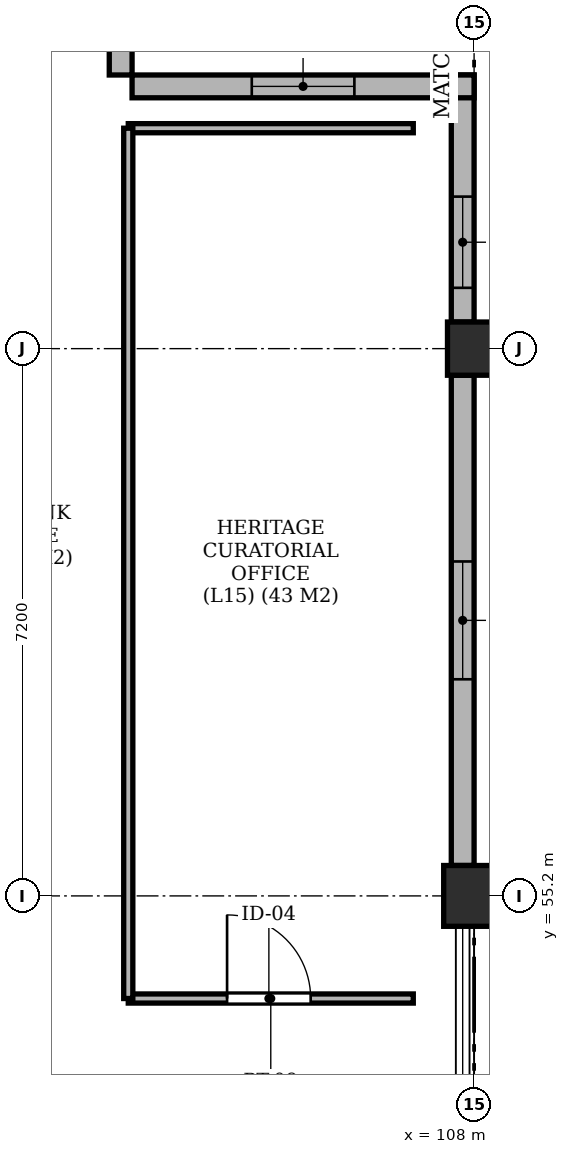
"""IFC4 building model, lengths in metres.
Left out: names, types, materials, properties, quantities, classifications, styles, units other than length and angle.
Written with IfcOpenShell. Run it as: python <this file> out.ifc"""

import sys

from ifc_helpers import new_model, si_unit, direction, frame, frame_2d, origin, origin_2d, place, context, subcontext, project, spatial, rectangle, extrude, element, fill, save


model = new_model("IFC4")
c1 = context("Model", 3, precision=1e-05, world=origin(), true_north=direction((0.0, 1.0)))
c2 = subcontext(c1, "Body", "Model", "MODEL_VIEW")
j1 = project(units=[si_unit("LENGTHUNIT", "METRE"), si_unit("PLANEANGLEUNIT", "RADIAN")], contexts=[c1])
p1 = place(None, origin())
s1 = spatial("IfcSite", under=j1, at=p1, CompositionType="ELEMENT")
p2 = place(p1, origin())
s2 = spatial("IfcBuilding", under=s1, at=p2, CompositionType="ELEMENT")
p3 = place(p2, frame((0.0, 0.0, 60.05)))
s3 = spatial("IfcBuildingStorey", under=s2, at=p3, CompositionType="ELEMENT", Elevation=60.05)
p4 = place(p3, frame((108.0, 55.2, -0.21), z_axis=(0.0, 0.0, 1.0), x_axis=(1.0, 0.0, 0.0)))
e1 = element("IfcColumn", 1, at=p4, inside=s3, PredefinedType="COLUMN", context=c2, shape_type="SweptSolid", body=[
    extrude(rectangle(XDim=0.8, YDim=0.8, at=origin_2d()), origin(), (0.0, 0.0, 1.0), 3.25),
])
p5 = place(p3, frame((108.0, 62.4, -0.21), z_axis=(0.0, 0.0, 1.0), x_axis=(1.0, 0.0, 0.0)))
e2 = element("IfcColumn", 2, at=p5, inside=s3, PredefinedType="COLUMN", context=c2, shape_type="SweptSolid", body=[
    extrude(rectangle(XDim=0.7, YDim=0.7, at=origin_2d()), origin(), (0.0, 0.0, 1.0), 3.25),
])
p6 = place(p3, frame((107.85, 55.6, 0.0), z_axis=(0.0, 0.0, 1.0), x_axis=(0.0, 1.0, 0.0)))
e3 = element("IfcWall", 3, at=p6, inside=s3, PredefinedType="SOLIDWALL", context=c2, shape_type="SweptSolid", body=[
    extrude(rectangle(XDim=6.45, YDim=0.3, at=frame_2d((3.225, 0.0))), origin(), (0.0, 0.0, 1.0), 2.53),
])
p7 = place(p6, frame((2.45, 0.0, 0.62)))
e4 = element("IfcOpeningElement", 4, at=p7, cuts=e3, PredefinedType="OPENING", context=c2, shape_type="SweptSolid", body=[
    extrude(rectangle(XDim=1.55, YDim=1.81, at=frame_2d((0.775, 0.905))), frame((0.0, 0.162, 0.0), z_axis=(0.0, -1.0, 0.0), x_axis=(1.0, 0.0, 0.0)), (0.0, 0.0, 1.0), 0.324),
])
p8 = place(p3, frame((107.85, 62.75, 0.0), z_axis=(0.0, 0.0, 1.0), x_axis=(0.0, 1.0, 0.0)))
e5 = element("IfcWall", 5, at=p8, inside=s3, PredefinedType="SOLIDWALL", context=c2, shape_type="SweptSolid", body=[
    extrude(rectangle(XDim=3.25, YDim=0.3, at=frame_2d((1.625, 0.0))), origin(), (0.0, 0.0, 1.0), 2.53),
])
p9 = place(p8, frame((0.45, 0.0, 0.62)))
e6 = element("IfcOpeningElement", 6, at=p9, cuts=e5, PredefinedType="OPENING", context=c2, shape_type="SweptSolid", body=[
    extrude(rectangle(XDim=1.2, YDim=1.65, at=frame_2d((0.6, 0.825))), frame((0.0, 0.162, 0.0), z_axis=(0.0, -1.0, 0.0), x_axis=(1.0, 0.0, 0.0)), (0.0, 0.0, 1.0), 0.324),
])
p10 = place(p3, frame((108.0, 65.85, 0.0), z_axis=(0.0, 0.0, 1.0), x_axis=(-1.0, 0.0, 0.0)))
e7 = element("IfcWall", 7, at=p10, inside=s3, PredefinedType="SOLIDWALL", context=c2, shape_type="SweptSolid", body=[
    extrude(rectangle(XDim=4.5, YDim=0.3, at=frame_2d((2.25, 0.0))), origin(), (0.0, 0.0, 1.0), 2.53),
])
p11 = place(p10, frame((1.575, 0.0, 0.62)))
e8 = element("IfcOpeningElement", 8, at=p11, cuts=e7, PredefinedType="OPENING", context=c2, shape_type="SweptSolid", body=[
    extrude(rectangle(XDim=1.35, YDim=1.8, at=frame_2d((0.675, 0.9))), frame((0.0, 0.162, 0.0), z_axis=(0.0, -1.0, 0.0), x_axis=(1.0, 0.0, 0.0)), (0.0, 0.0, 1.0), 0.324),
])
p12 = place(p3, frame((103.35, 66.0, 0.0), z_axis=(0.0, 0.0, 1.0), x_axis=(0.0, 1.0, 0.0)))
e9 = element("IfcWall", 9, at=p12, inside=s3, PredefinedType="SOLIDWALL", context=c2, shape_type="SweptSolid", body=[
    extrude(rectangle(XDim=3.6, YDim=0.3, at=frame_2d((1.8, 0.0))), origin(), (0.0, 0.0, 1.0), 2.53),
])
p13 = place(p12, frame((1.175, 0.0, 0.62)))
e10 = element("IfcOpeningElement", 10, at=p13, cuts=e9, PredefinedType="OPENING", context=c2, shape_type="SweptSolid", body=[
    extrude(rectangle(XDim=1.25, YDim=1.75, at=frame_2d((0.625, 0.875))), frame((0.0, 0.162, 0.0), z_axis=(0.0, -1.0, 0.0), x_axis=(1.0, 0.0, 0.0)), (0.0, 0.0, 1.0), 0.324),
])
p14 = place(p3, frame((103.45, 53.85, 0.0), z_axis=(0.0, 0.0, 1.0), x_axis=(1.0, 0.0, 0.0)))
e11 = element("IfcWall", 11, at=p14, inside=s3, PredefinedType="PARTITIONING", context=c2, shape_type="SweptSolid", body=[
    extrude(rectangle(XDim=3.75, YDim=0.12, at=frame_2d((1.875, 0.0))), origin(), (0.0, 0.0, 1.0), 2.53),
])
p15 = place(p14, frame((1.3, 0.0, 0.0)))
e12 = element("IfcOpeningElement", 12, at=p15, cuts=e11, PredefinedType="OPENING", context=c2, shape_type="SweptSolid", body=[
    extrude(rectangle(XDim=1.1, YDim=2.15, at=frame_2d((0.55, 1.075))), frame((0.0, 0.072, 0.0), z_axis=(0.0, -1.0, 0.0), x_axis=(1.0, 0.0, 0.0)), (0.0, 0.0, 1.0), 0.144),
])
p16 = place(p3, frame((103.45, 65.3, 0.0), z_axis=(0.0, 0.0, 1.0), x_axis=(1.0, 0.0, 0.0)))
e13 = element("IfcWall", 13, at=p16, inside=s3, PredefinedType="PARTITIONING", context=c2, shape_type="SweptSolid", body=[
    extrude(rectangle(XDim=3.75, YDim=0.12, at=frame_2d((1.875, 0.0))), origin(), (0.0, 0.0, 1.0), 2.53),
])
p17 = place(p3, frame((103.45, 53.85, 0.0), z_axis=(0.0, 0.0, 1.0), x_axis=(0.0, 1.0, 0.0)))
e14 = element("IfcWall", 14, at=p17, inside=s3, PredefinedType="PARTITIONING", context=c2, shape_type="SweptSolid", body=[
    extrude(rectangle(XDim=11.45, YDim=0.12, at=frame_2d((5.725, 0.0))), origin(), (0.0, 0.0, 1.0), 2.53),
])
p18 = place(p7, origin())
e15 = element("IfcWindow", 15, at=p18, inside=s3, PartitioningType="SINGLE_PANEL", PredefinedType="WINDOW", context=c2, shape_type="SweptSolid", body=[
    extrude(rectangle(XDim=1.55, YDim=1.81, at=frame_2d((0.775, 0.905))), frame((0.0, 0.03, 0.0), z_axis=(0.0, -1.0, 0.0), x_axis=(1.0, 0.0, 0.0)), (0.0, 0.0, 1.0), 0.06),
])
fill(e4, e15)
p19 = place(p9, origin())
e16 = element("IfcWindow", 16, at=p19, inside=s3, PartitioningType="SINGLE_PANEL", PredefinedType="WINDOW", context=c2, shape_type="SweptSolid", body=[
    extrude(rectangle(XDim=1.2, YDim=1.65, at=frame_2d((0.6, 0.825))), frame((0.0, 0.03, 0.0), z_axis=(0.0, -1.0, 0.0), x_axis=(1.0, 0.0, 0.0)), (0.0, 0.0, 1.0), 0.06),
])
fill(e6, e16)
p20 = place(p11, origin())
e17 = element("IfcWindow", 17, at=p20, inside=s3, PartitioningType="SINGLE_PANEL", PredefinedType="WINDOW", context=c2, shape_type="SweptSolid", body=[
    extrude(rectangle(XDim=1.35, YDim=1.8, at=frame_2d((0.675, 0.9))), frame((0.0, 0.03, 0.0), z_axis=(0.0, -1.0, 0.0), x_axis=(1.0, 0.0, 0.0)), (0.0, 0.0, 1.0), 0.06),
])
fill(e8, e17)
p21 = place(p15, origin())
e18 = element("IfcDoor", 18, at=p21, inside=s3, OperationType="SINGLE_SWING_LEFT", PredefinedType="DOOR", context=c2, shape_type="SweptSolid", body=[
    extrude(rectangle(XDim=1.1, YDim=2.15, at=frame_2d((0.55, 1.075))), frame((0.0, 0.025, 0.0), z_axis=(0.0, -1.0, 0.0), x_axis=(1.0, 0.0, 0.0)), (0.0, 0.0, 1.0), 0.05),
])
fill(e12, e18)
save(model, sys.argv[1])
